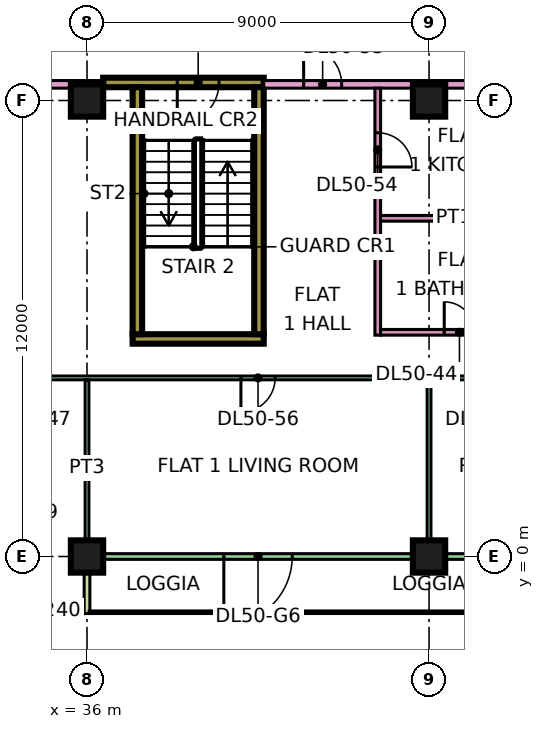
"""IFC4 building model, lengths in metres.
Left out: names, types, materials, properties, quantities, classifications, styles, units other than length and angle.
Written with IfcOpenShell. Run it as: python <this file> out.ifc"""

import sys

from ifc_helpers import new_model, si_unit, direction, frame, frame_2d, origin, origin_2d, place, context, subcontext, project, spatial, rectangle, extrude, element, fill, save


model = new_model("IFC4")
c1 = context("Model", 3, precision=1e-05, world=origin(), true_north=direction((0.0, 1.0)))
c2 = subcontext(c1, "Body", "Model", "MODEL_VIEW")
j1 = project(units=[si_unit("LENGTHUNIT", "METRE"), si_unit("PLANEANGLEUNIT", "RADIAN")], contexts=[c1])
p1 = place(None, origin())
s1 = spatial("IfcSite", under=j1, at=p1, CompositionType="ELEMENT")
p2 = place(p1, origin())
s2 = spatial("IfcBuilding", under=s1, at=p2, CompositionType="ELEMENT")
p3 = place(p2, frame((0.0, 0.0, 215.4)))
s3 = spatial("IfcBuildingStorey", under=s2, at=p3, CompositionType="ELEMENT", Elevation=215.4)
for number, where, z_axis, x_axis in (
    (1, (36.0, 0.0, 0.0), (0.0, 0.0, 1.0), (1.0, 0.0, 0.0)),
    (2, (36.0, 12.0, 0.0), (0.0, 0.0, 1.0), (1.0, 0.0, 0.0)),
    (3, (45.0, 0.0, 0.0), (0.0, 0.0, 1.0), (1.0, 0.0, 0.0)),
    (4, (45.0, 12.0, 0.0), (0.0, 0.0, 1.0), (1.0, 0.0, 0.0)),
):
    element("IfcColumn", number, at=place(p3, frame(where, z_axis=z_axis, x_axis=x_axis)), inside=s3, PredefinedType="COLUMN", context=c2, shape_type="SweptSolid", body=[
        extrude(rectangle(XDim=0.85, YDim=0.85, at=origin_2d()), origin(), (0.0, 0.0, 1.0), 3.75),
    ])
p4 = place(p3, frame((37.2, 5.725, 0.0), z_axis=(0.0, 0.0, 1.0), x_axis=(1.0, 0.0, 0.0)))
e5 = element("IfcWall", 5, at=p4, inside=s3, PredefinedType="SHEAR", context=c2, shape_type="SweptSolid", body=[
    extrude(rectangle(XDim=3.45, YDim=0.25, at=frame_2d((1.725, 0.0))), origin(), (0.0, 0.0, 1.0), 3.75),
])
p5 = place(p3, frame((36.425, 12.475, 0.0), z_axis=(0.0, 0.0, 1.0), x_axis=(1.0, 0.0, 0.0)))
e6 = element("IfcWall", 6, at=p5, inside=s3, PredefinedType="SHEAR", context=c2, shape_type="SweptSolid", body=[
    extrude(rectangle(XDim=4.225, YDim=0.25, at=frame_2d((2.112, 0.0))), origin(), (0.0, 0.0, 1.0), 3.75),
])
p6 = place(p5, frame((1.95, 0.0, 0.0)))
e7 = element("IfcOpeningElement", 7, at=p6, cuts=e6, PredefinedType="OPENING", context=c2, shape_type="SweptSolid", body=[
    extrude(rectangle(XDim=1.1, YDim=2.2, at=frame_2d((0.55, 1.1))), frame((0.0, 0.135, 0.0), z_axis=(0.0, -1.0, 0.0), x_axis=(1.0, 0.0, 0.0)), (0.0, 0.0, 1.0), 0.27),
])
for number, where, z_axis, x_axis in (
    (8, (37.325, 5.85, 0.0), (0.0, 0.0, 1.0), (0.0, 1.0, 0.0)),
    (9, (40.525, 5.85, 0.0), (0.0, 0.0, 1.0), (0.0, 1.0, 0.0)),
):
    element("IfcWall", number, at=place(p3, frame(where, z_axis=z_axis, x_axis=x_axis)), inside=s3, PredefinedType="SHEAR", context=c2, shape_type="SweptSolid", body=[
        extrude(rectangle(XDim=6.5, YDim=0.25, at=frame_2d((3.25, 0.0))), origin(), (0.0, 0.0, 1.0), 3.75),
    ])
p7 = place(p3, frame((24.075, -1.425, 0.0), z_axis=(0.0, 0.0, 1.0), x_axis=(1.0, 0.0, 0.0)))
e10 = element("IfcWall", 10, at=p7, inside=s3, PredefinedType="SOLIDWALL", context=c2, shape_type="SweptSolid", body=[
    extrude(rectangle(XDim=11.85, YDim=0.15, at=frame_2d((5.925, 0.0))), origin(), (0.0, 0.0, 1.0), 3.35),
])
p8 = place(p7, frame((0.562, 0.0, 0.45)))
e11 = element("IfcOpeningElement", 11, at=p8, cuts=e10, PredefinedType="OPENING", context=c2, shape_type="SweptSolid", body=[
    extrude(rectangle(XDim=1.8, YDim=2.4, at=frame_2d((0.9, 1.2))), frame((0.0, 0.085, 0.0), z_axis=(0.0, -1.0, 0.0), x_axis=(1.0, 0.0, 0.0)), (0.0, 0.0, 1.0), 0.17),
])
p9 = place(p7, frame((4.425, 0.0, 0.45)))
e12 = element("IfcOpeningElement", 12, at=p9, cuts=e10, PredefinedType="OPENING", context=c2, shape_type="SweptSolid", body=[
    extrude(rectangle(XDim=3.0, YDim=2.4, at=frame_2d((1.5, 1.2))), frame((0.0, 0.085, 0.0), z_axis=(0.0, -1.0, 0.0), x_axis=(1.0, 0.0, 0.0)), (0.0, 0.0, 1.0), 0.17),
])
p10 = place(p7, frame((9.488, 0.0, 0.45)))
e13 = element("IfcOpeningElement", 13, at=p10, cuts=e10, PredefinedType="OPENING", context=c2, shape_type="SweptSolid", body=[
    extrude(rectangle(XDim=1.8, YDim=2.4, at=frame_2d((0.9, 1.2))), frame((0.0, 0.085, 0.0), z_axis=(0.0, -1.0, 0.0), x_axis=(1.0, 0.0, 0.0)), (0.0, 0.0, 1.0), 0.17),
])
p11 = place(p3, frame((36.075, 0.0, 0.0), z_axis=(0.0, 0.0, 1.0), x_axis=(1.0, 0.0, 0.0)))
e14 = element("IfcWall", 14, at=p11, inside=s3, PredefinedType="SOLIDWALL", context=c2, shape_type="SweptSolid", body=[
    extrude(rectangle(XDim=11.85, YDim=0.15, at=frame_2d((5.925, 0.0))), origin(), (0.0, 0.0, 1.0), 3.35),
])
p12 = place(p11, frame((3.525, 0.0, 0.0)))
e15 = element("IfcOpeningElement", 15, at=p12, cuts=e14, PredefinedType="OPENING", context=c2, shape_type="SweptSolid", body=[
    extrude(rectangle(XDim=1.8, YDim=2.4, at=frame_2d((0.9, 1.2))), frame((0.0, 0.085, 0.0), z_axis=(0.0, -1.0, 0.0), x_axis=(1.0, 0.0, 0.0)), (0.0, 0.0, 1.0), 0.17),
])
p13 = place(p11, frame((10.05, 0.0, 0.45)))
e16 = element("IfcOpeningElement", 16, at=p13, cuts=e14, PredefinedType="OPENING", context=c2, shape_type="SweptSolid", body=[
    extrude(rectangle(XDim=1.2, YDim=2.4, at=frame_2d((0.6, 1.2))), frame((0.0, 0.085, 0.0), z_axis=(0.0, -1.0, 0.0), x_axis=(1.0, 0.0, 0.0)), (0.0, 0.0, 1.0), 0.17),
])
p14 = place(p3, frame((36.0, -1.5, 0.0), z_axis=(0.0, 0.0, 1.0), x_axis=(0.0, 1.0, 0.0)))
e17 = element("IfcWall", 17, at=p14, inside=s3, PredefinedType="SOLIDWALL", context=c2, shape_type="SweptSolid", body=[
    extrude(rectangle(XDim=1.5, YDim=0.15, at=frame_2d((0.75, 0.0))), origin(), (0.0, 0.0, 1.0), 3.35),
])
p15 = place(p3, frame((33.05, 4.7, 0.0), z_axis=(0.0, 0.0, 1.0), x_axis=(1.0, 0.0, 0.0)))
e18 = element("IfcWall", 18, at=p15, inside=s3, PredefinedType="PARTITIONING", context=c2, shape_type="SweptSolid", body=[
    extrude(rectangle(XDim=14.85, YDim=0.1, at=frame_2d((7.425, 0.0))), origin(), (0.0, 0.0, 1.0), 3.35),
])
p16 = place(p15, frame((1.0, 0.0, 0.0)))
e19 = element("IfcOpeningElement", 19, at=p16, cuts=e18, PredefinedType="OPENING", context=c2, shape_type="SweptSolid", body=[
    extrude(rectangle(XDim=0.9, YDim=2.1, at=frame_2d((0.45, 1.05))), frame((0.0, 0.06, 0.0), z_axis=(0.0, -1.0, 0.0), x_axis=(1.0, 0.0, 0.0)), (0.0, 0.0, 1.0), 0.12),
])
p17 = place(p15, frame((13.0, 0.0, 0.0)))
e20 = element("IfcOpeningElement", 20, at=p17, cuts=e18, PredefinedType="OPENING", context=c2, shape_type="SweptSolid", body=[
    extrude(rectangle(XDim=0.9, YDim=2.1, at=frame_2d((0.45, 1.05))), frame((0.0, 0.06, 0.0), z_axis=(0.0, -1.0, 0.0), x_axis=(1.0, 0.0, 0.0)), (0.0, 0.0, 1.0), 0.12),
])
p18 = place(p15, frame((7.0, 0.0, 0.0)))
e21 = element("IfcOpeningElement", 21, at=p18, cuts=e18, PredefinedType="OPENING", context=c2, shape_type="SweptSolid", body=[
    extrude(rectangle(XDim=0.9, YDim=2.1, at=frame_2d((0.45, 1.05))), frame((0.0, 0.06, 0.0), z_axis=(0.0, -1.0, 0.0), x_axis=(1.0, 0.0, 0.0)), (0.0, 0.0, 1.0), 0.12),
])
p19 = place(p3, frame((34.0, 12.425, 0.0), z_axis=(0.0, 0.0, 1.0), x_axis=(1.0, 0.0, 0.0)))
e22 = element("IfcWall", 22, at=p19, inside=s3, PredefinedType="PARTITIONING", context=c2, shape_type="SweptSolid", body=[
    extrude(rectangle(XDim=2.426, YDim=0.2, at=frame_2d((1.213, 0.0))), origin(), (0.0, 0.0, 1.0), 3.35),
])
p20 = place(p3, frame((36.0, 0.0, 0.0), z_axis=(0.0, 0.0, 1.0), x_axis=(0.0, 1.0, 0.0)))
e23 = element("IfcWall", 23, at=p20, inside=s3, PredefinedType="PARTITIONING", context=c2, shape_type="SweptSolid", body=[
    extrude(rectangle(XDim=4.65, YDim=0.1, at=frame_2d((2.325, 0.0))), origin(), (0.0, 0.0, 1.0), 3.35),
])
p21 = place(p3, frame((40.65, 12.425, 0.0), z_axis=(0.0, 0.0, 1.0), x_axis=(1.0, 0.0, 0.0)))
e24 = element("IfcWall", 24, at=p21, inside=s3, PredefinedType="PARTITIONING", context=c2, shape_type="SweptSolid", body=[
    extrude(rectangle(XDim=22.276, YDim=0.2, at=frame_2d((11.138, 0.0))), origin(), (0.0, 0.0, 1.0), 3.35),
])
p22 = place(p21, frame((17.1, 0.0, 0.0)))
e25 = element("IfcOpeningElement", 25, at=p22, cuts=e24, PredefinedType="OPENING", context=c2, shape_type="SweptSolid", body=[
    extrude(rectangle(XDim=1.0, YDim=2.1, at=frame_2d((0.5, 1.05))), frame((0.0, 0.11, 0.0), z_axis=(0.0, -1.0, 0.0), x_axis=(1.0, 0.0, 0.0)), (0.0, 0.0, 1.0), 0.22),
])
p23 = place(p21, frame((1.05, 0.0, 0.0)))
e26 = element("IfcOpeningElement", 26, at=p23, cuts=e24, PredefinedType="OPENING", context=c2, shape_type="SweptSolid", body=[
    extrude(rectangle(XDim=1.0, YDim=2.1, at=frame_2d((0.5, 1.05))), frame((0.0, 0.11, 0.0), z_axis=(0.0, -1.0, 0.0), x_axis=(1.0, 0.0, 0.0)), (0.0, 0.0, 1.0), 0.22),
])
p24 = place(p3, frame((43.65, 5.825, 0.0), z_axis=(0.0, 0.0, 1.0), x_axis=(0.0, 1.0, 0.0)))
e27 = element("IfcWall", 27, at=p24, inside=s3, PredefinedType="PARTITIONING", context=c2, shape_type="SweptSolid", body=[
    extrude(rectangle(XDim=6.5, YDim=0.15, at=frame_2d((3.25, 0.0))), origin(), (0.0, 0.0, 1.0), 3.35),
])
p25 = place(p24, frame((4.425, 0.0, 0.0)))
e28 = element("IfcOpeningElement", 28, at=p25, cuts=e27, PredefinedType="OPENING", context=c2, shape_type="SweptSolid", body=[
    extrude(rectangle(XDim=0.9, YDim=2.1, at=frame_2d((0.45, 1.05))), frame((0.0, 0.085, 0.0), z_axis=(0.0, -1.0, 0.0), x_axis=(1.0, 0.0, 0.0)), (0.0, 0.0, 1.0), 0.17),
])
p26 = place(p3, frame((43.725, 5.9, 0.0), z_axis=(0.0, 0.0, 1.0), x_axis=(1.0, 0.0, 0.0)))
e29 = element("IfcWall", 29, at=p26, inside=s3, PredefinedType="PARTITIONING", context=c2, shape_type="SweptSolid", body=[
    extrude(rectangle(XDim=4.175, YDim=0.15, at=frame_2d((2.087, 0.0))), origin(), (0.0, 0.0, 1.0), 3.35),
])
p27 = place(p26, frame((1.675, 0.0, 0.0)))
e30 = element("IfcOpeningElement", 30, at=p27, cuts=e29, PredefinedType="OPENING", context=c2, shape_type="SweptSolid", body=[
    extrude(rectangle(XDim=0.8, YDim=2.1, at=frame_2d((0.4, 1.05))), frame((0.0, 0.085, 0.0), z_axis=(0.0, -1.0, 0.0), x_axis=(1.0, 0.0, 0.0)), (0.0, 0.0, 1.0), 0.17),
])
p28 = place(p3, frame((43.725, 8.9, 0.0), z_axis=(0.0, 0.0, 1.0), x_axis=(1.0, 0.0, 0.0)))
e31 = element("IfcWall", 31, at=p28, inside=s3, PredefinedType="PARTITIONING", context=c2, shape_type="SweptSolid", body=[
    extrude(rectangle(XDim=4.175, YDim=0.15, at=frame_2d((2.087, 0.0))), origin(), (0.0, 0.0, 1.0), 3.35),
])
p29 = place(p3, frame((45.0, 0.074, 0.0), z_axis=(0.0, 0.0, 1.0), x_axis=(0.0, 1.0, 0.0)))
e32 = element("IfcWall", 32, at=p29, inside=s3, PredefinedType="PARTITIONING", context=c2, shape_type="SweptSolid", body=[
    extrude(rectangle(XDim=4.576, YDim=0.1, at=frame_2d((2.288, 0.0))), origin(), (0.0, 0.0, 1.0), 3.35),
])
p30 = place(p10, origin())
e33 = element("IfcWindow", 33, at=p30, inside=s3, PartitioningType="SINGLE_PANEL", PredefinedType="WINDOW", context=c2, shape_type="SweptSolid", body=[
    extrude(rectangle(XDim=1.8, YDim=2.4, at=frame_2d((0.9, 1.2))), frame((0.0, 0.03, 0.0), z_axis=(0.0, -1.0, 0.0), x_axis=(1.0, 0.0, 0.0)), (0.0, 0.0, 1.0), 0.06),
])
fill(e13, e33)
p31 = place(p12, frame((1.8, 0.0, 0.0), z_axis=(0.0, 0.0, 1.0), x_axis=(-1.0, 0.0, 0.0)))
e34 = element("IfcDoor", 34, at=p31, inside=s3, OperationType="DOUBLE_DOOR_SINGLE_SWING", PredefinedType="DOOR", context=c2, shape_type="SweptSolid", body=[
    extrude(rectangle(XDim=1.8, YDim=2.4, at=frame_2d((0.9, 1.2))), frame((0.0, 0.025, 0.0), z_axis=(0.0, -1.0, 0.0), x_axis=(1.0, 0.0, 0.0)), (0.0, 0.0, 1.0), 0.05),
])
fill(e15, e34)
p32 = place(p6, frame((1.1, 0.0, 0.0), z_axis=(0.0, 0.0, 1.0), x_axis=(-1.0, 0.0, 0.0)))
e35 = element("IfcDoor", 35, at=p32, inside=s3, OperationType="SINGLE_SWING_LEFT", PredefinedType="DOOR", context=c2, shape_type="SweptSolid", body=[
    extrude(rectangle(XDim=1.1, YDim=2.2, at=frame_2d((0.55, 1.1))), frame((0.0, 0.025, 0.0), z_axis=(0.0, -1.0, 0.0), x_axis=(1.0, 0.0, 0.0)), (0.0, 0.0, 1.0), 0.05),
])
fill(e7, e35)
p33 = place(p27, origin())
e36 = element("IfcDoor", 36, at=p33, inside=s3, OperationType="SINGLE_SWING_LEFT", PredefinedType="DOOR", context=c2, shape_type="SweptSolid", body=[
    extrude(rectangle(XDim=0.8, YDim=2.1, at=frame_2d((0.4, 1.05))), frame((0.0, 0.025, 0.0), z_axis=(0.0, -1.0, 0.0), x_axis=(1.0, 0.0, 0.0)), (0.0, 0.0, 1.0), 0.05),
])
fill(e30, e36)
p34 = place(p23, origin())
e37 = element("IfcDoor", 37, at=p34, inside=s3, OperationType="SINGLE_SWING_LEFT", PredefinedType="DOOR", context=c2, shape_type="SweptSolid", body=[
    extrude(rectangle(XDim=1.0, YDim=2.1, at=frame_2d((0.5, 1.05))), frame((0.0, 0.025, 0.0), z_axis=(0.0, -1.0, 0.0), x_axis=(1.0, 0.0, 0.0)), (0.0, 0.0, 1.0), 0.05),
])
fill(e26, e37)
p35 = place(p25, frame((0.9, 0.0, 0.0), z_axis=(0.0, 0.0, 1.0), x_axis=(-1.0, 0.0, 0.0)))
e38 = element("IfcDoor", 38, at=p35, inside=s3, OperationType="SINGLE_SWING_LEFT", PredefinedType="DOOR", context=c2, shape_type="SweptSolid", body=[
    extrude(rectangle(XDim=0.9, YDim=2.1, at=frame_2d((0.45, 1.05))), frame((0.0, 0.025, 0.0), z_axis=(0.0, -1.0, 0.0), x_axis=(1.0, 0.0, 0.0)), (0.0, 0.0, 1.0), 0.05),
])
fill(e28, e38)
p36 = place(p18, frame((0.9, 0.0, 0.0), z_axis=(0.0, 0.0, 1.0), x_axis=(-1.0, 0.0, 0.0)))
e39 = element("IfcDoor", 39, at=p36, inside=s3, OperationType="SINGLE_SWING_LEFT", PredefinedType="DOOR", context=c2, shape_type="SweptSolid", body=[
    extrude(rectangle(XDim=0.9, YDim=2.1, at=frame_2d((0.45, 1.05))), frame((0.0, 0.025, 0.0), z_axis=(0.0, -1.0, 0.0), x_axis=(1.0, 0.0, 0.0)), (0.0, 0.0, 1.0), 0.05),
])
fill(e21, e39)
save(model, sys.argv[1])
